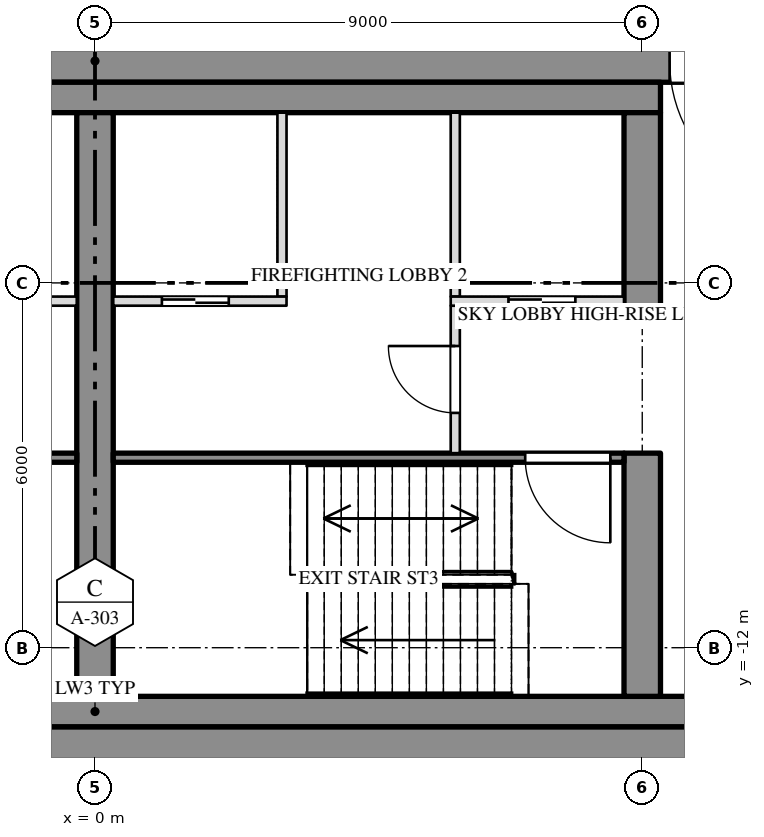
"""IFC4 building model, lengths in metres.
Left out: names, types, materials, properties, quantities, classifications, styles, units other than length and angle.
Written with IfcOpenShell. Run it as: python <this file> out.ifc"""

import sys

from ifc_helpers import new_model, si_unit, direction, frame, frame_2d, origin, place, context, subcontext, project, spatial, rectangle, extrude, element, fill, save


model = new_model("IFC4")
c1 = context("Model", 3, precision=1e-05, world=origin(), true_north=direction((0.0, 1.0)))
c2 = subcontext(c1, "Body", "Model", "MODEL_VIEW")
j1 = project(units=[si_unit("LENGTHUNIT", "METRE"), si_unit("PLANEANGLEUNIT", "RADIAN")], contexts=[c1])
p1 = place(None, origin())
s1 = spatial("IfcSite", under=j1, at=p1, CompositionType="ELEMENT")
p2 = place(p1, origin())
s2 = spatial("IfcBuilding", under=s1, at=p2, CompositionType="ELEMENT")
p3 = place(p2, frame((0.0, 0.0, 264.5)))
s3 = spatial("IfcBuildingStorey", under=s2, at=p3, CompositionType="ELEMENT", Elevation=264.5)
p4 = place(p3, frame((-27.0, -2.35, 0.0), z_axis=(0.0, 0.0, 1.0), x_axis=(1.0, 0.0, 0.0)))
e1 = element("IfcWall", 1, at=p4, inside=s3, PredefinedType="SHEAR", context=c2, shape_type="SweptSolid", body=[
    extrude(rectangle(XDim=54.0, YDim=0.7, at=frame_2d((27.0, 0.0))), origin(), (0.0, 0.0, 1.0), 3.65),
])
p5 = place(p4, frame((15.15, 0.0, 0.0)))
e2 = element("IfcOpeningElement", 2, at=p5, cuts=e1, PredefinedType="OPENING", context=c2, shape_type="SweptSolid", body=[
    extrude(rectangle(XDim=2.4, YDim=2.1, at=frame_2d((1.2, 1.05))), frame((0.0, 0.362, 0.0), z_axis=(0.0, -1.0, 0.0), x_axis=(1.0, 0.0, 0.0)), (0.0, 0.0, 1.0), 0.724),
])
p6 = place(p4, frame((36.45, 0.0, 0.0)))
e3 = element("IfcOpeningElement", 3, at=p6, cuts=e1, PredefinedType="OPENING", context=c2, shape_type="SweptSolid", body=[
    extrude(rectangle(XDim=2.4, YDim=2.1, at=frame_2d((1.2, 1.05))), frame((0.0, 0.362, 0.0), z_axis=(0.0, -1.0, 0.0), x_axis=(1.0, 0.0, 0.0)), (0.0, 0.0, 1.0), 0.724),
])
p7 = place(p3, frame((-27.0, -13.65, 0.0), z_axis=(0.0, 0.0, 1.0), x_axis=(1.0, 0.0, 0.0)))
e4 = element("IfcWall", 4, at=p7, inside=s3, PredefinedType="SHEAR", context=c2, shape_type="SweptSolid", body=[
    extrude(rectangle(XDim=54.0, YDim=0.7, at=frame_2d((27.0, 0.0))), origin(), (0.0, 0.0, 1.0), 3.65),
])
p8 = place(p3, frame((-9.3, -2.95, 0.0), z_axis=(0.0, 0.0, 1.0), x_axis=(1.0, 0.0, 0.0)))
e5 = element("IfcWall", 5, at=p8, inside=s3, PredefinedType="SHEAR", context=c2, shape_type="SweptSolid", body=[
    extrude(rectangle(XDim=18.6, YDim=0.5, at=frame_2d((9.3, 0.0))), origin(), (0.0, 0.0, 1.0), 3.65),
])
p9 = place(p3, frame((-26.3, -13.05, 0.0), z_axis=(0.0, 0.0, 1.0), x_axis=(1.0, 0.0, 0.0)))
e6 = element("IfcWall", 6, at=p9, inside=s3, PredefinedType="SHEAR", context=c2, shape_type="SweptSolid", body=[
    extrude(rectangle(XDim=52.6, YDim=0.5, at=frame_2d((26.3, 0.0))), origin(), (0.0, 0.0, 1.0), 3.65),
])
p10 = place(p3, frame((0.0, -12.8, 0.0), z_axis=(0.0, 0.0, 1.0), x_axis=(0.0, 1.0, 0.0)))
e7 = element("IfcWall", 7, at=p10, inside=s3, PredefinedType="SHEAR", context=c2, shape_type="SweptSolid", body=[
    extrude(rectangle(XDim=9.6, YDim=0.6, at=frame_2d((4.8, 0.0))), origin(), (0.0, 0.0, 1.0), 3.65),
])
p11 = place(p3, frame((9.0, -12.8, 0.0), z_axis=(0.0, 0.0, 1.0), x_axis=(0.0, 1.0, 0.0)))
e8 = element("IfcWall", 8, at=p11, inside=s3, PredefinedType="SHEAR", context=c2, shape_type="SweptSolid", body=[
    extrude(rectangle(XDim=4.0, YDim=0.6, at=frame_2d((2.0, 0.0))), origin(), (0.0, 0.0, 1.0), 3.65),
])
p12 = place(p3, frame((9.0, -6.375, 0.0), z_axis=(0.0, 0.0, 1.0), x_axis=(0.0, 1.0, 0.0)))
e9 = element("IfcWall", 9, at=p12, inside=s3, PredefinedType="SHEAR", context=c2, shape_type="SweptSolid", body=[
    extrude(rectangle(XDim=3.175, YDim=0.6, at=frame_2d((1.587, 0.0))), origin(), (0.0, 0.0, 1.0), 3.65),
])
for number, where, z_axis, x_axis in (
    (10, (3.075, -6.225, 0.0), (0.0, 0.0, 1.0), (0.0, 1.0, 0.0)),
    (11, (5.925, -6.225, 0.0), (0.0, 0.0, 1.0), (0.0, 1.0, 0.0)),
):
    element("IfcWall", number, at=place(p3, frame(where, z_axis=z_axis, x_axis=x_axis)), inside=s3, PredefinedType="PARTITIONING", context=c2, shape_type="SweptSolid", body=[
        extrude(rectangle(XDim=3.025, YDim=0.15, at=frame_2d((1.513, 0.0))), origin(), (0.0, 0.0, 1.0), 3.65),
    ])
p13 = place(p3, frame((5.925, -8.8, 0.0), z_axis=(0.0, 0.0, 1.0), x_axis=(0.0, 1.0, 0.0)))
e12 = element("IfcWall", 12, at=p13, inside=s3, PredefinedType="PARTITIONING", context=c2, shape_type="SweptSolid", body=[
    extrude(rectangle(XDim=2.425, YDim=0.15, at=frame_2d((1.212, 0.0))), origin(), (0.0, 0.0, 1.0), 3.65),
])
p14 = place(p13, frame((0.662, 0.0, 0.0)))
e13 = element("IfcOpeningElement", 13, at=p14, cuts=e12, PredefinedType="OPENING", context=c2, shape_type="SweptSolid", body=[
    extrude(rectangle(XDim=1.1, YDim=2.1, at=frame_2d((0.55, 1.05))), frame((0.0, 0.087, 0.0), z_axis=(0.0, -1.0, 0.0), x_axis=(1.0, 0.0, 0.0)), (0.0, 0.0, 1.0), 0.174),
])
p15 = place(p3, frame((-3.15, -6.3, 0.0), z_axis=(0.0, 0.0, 1.0), x_axis=(1.0, 0.0, 0.0)))
e14 = element("IfcWall", 14, at=p15, inside=s3, PredefinedType="PARTITIONING", context=c2, shape_type="SweptSolid", body=[
    extrude(rectangle(XDim=2.85, YDim=0.15, at=frame_2d((1.425, 0.0))), origin(), (0.0, 0.0, 1.0), 3.65),
])
p16 = place(p15, frame((0.95, 0.0, 0.0)))
e15 = element("IfcOpeningElement", 15, at=p16, cuts=e14, PredefinedType="OPENING", context=c2, shape_type="SweptSolid", body=[
    extrude(rectangle(XDim=1.1, YDim=2.1, at=frame_2d((0.55, 1.05))), frame((0.0, 0.087, 0.0), z_axis=(0.0, -1.0, 0.0), x_axis=(1.0, 0.0, 0.0)), (0.0, 0.0, 1.0), 0.174),
])
p17 = place(p3, frame((0.3, -6.3, 0.0), z_axis=(0.0, 0.0, 1.0), x_axis=(1.0, 0.0, 0.0)))
e16 = element("IfcWall", 16, at=p17, inside=s3, PredefinedType="PARTITIONING", context=c2, shape_type="SweptSolid", body=[
    extrude(rectangle(XDim=2.85, YDim=0.15, at=frame_2d((1.425, 0.0))), origin(), (0.0, 0.0, 1.0), 3.65),
])
p18 = place(p17, frame((0.8, 0.0, 0.0)))
e17 = element("IfcOpeningElement", 17, at=p18, cuts=e16, PredefinedType="OPENING", context=c2, shape_type="SweptSolid", body=[
    extrude(rectangle(XDim=1.1, YDim=2.1, at=frame_2d((0.55, 1.05))), frame((0.0, 0.087, 0.0), z_axis=(0.0, -1.0, 0.0), x_axis=(1.0, 0.0, 0.0)), (0.0, 0.0, 1.0), 0.174),
])
p19 = place(p3, frame((5.85, -6.3, 0.0), z_axis=(0.0, 0.0, 1.0), x_axis=(1.0, 0.0, 0.0)))
e18 = element("IfcWall", 18, at=p19, inside=s3, PredefinedType="PARTITIONING", context=c2, shape_type="SweptSolid", body=[
    extrude(rectangle(XDim=2.85, YDim=0.15, at=frame_2d((1.425, 0.0))), origin(), (0.0, 0.0, 1.0), 3.65),
])
p20 = place(p19, frame((0.95, 0.0, 0.0)))
e19 = element("IfcOpeningElement", 19, at=p20, cuts=e18, PredefinedType="OPENING", context=c2, shape_type="SweptSolid", body=[
    extrude(rectangle(XDim=1.1, YDim=2.1, at=frame_2d((0.55, 1.05))), frame((0.0, 0.087, 0.0), z_axis=(0.0, -1.0, 0.0), x_axis=(1.0, 0.0, 0.0)), (0.0, 0.0, 1.0), 0.174),
])
p21 = place(p3, frame((-8.7, -8.875, 0.0), z_axis=(0.0, 0.0, 1.0), x_axis=(1.0, 0.0, 0.0)))
e20 = element("IfcWall", 20, at=p21, inside=s3, PredefinedType="SHEAR", context=c2, shape_type="SweptSolid", body=[
    extrude(rectangle(XDim=8.4, YDim=0.15, at=frame_2d((4.2, 0.0))), origin(), (0.0, 0.0, 1.0), 3.65),
])
p22 = place(p21, frame((0.225, 0.0, 0.0)))
e21 = element("IfcOpeningElement", 21, at=p22, cuts=e20, PredefinedType="OPENING", context=c2, shape_type="SweptSolid", body=[
    extrude(rectangle(XDim=1.4, YDim=2.1, at=frame_2d((0.7, 1.05))), frame((0.0, 0.087, 0.0), z_axis=(0.0, -1.0, 0.0), x_axis=(1.0, 0.0, 0.0)), (0.0, 0.0, 1.0), 0.174),
])
p23 = place(p3, frame((0.3, -8.875, 0.0), z_axis=(0.0, 0.0, 1.0), x_axis=(1.0, 0.0, 0.0)))
e22 = element("IfcWall", 22, at=p23, inside=s3, PredefinedType="SHEAR", context=c2, shape_type="SweptSolid", body=[
    extrude(rectangle(XDim=8.4, YDim=0.15, at=frame_2d((4.2, 0.0))), origin(), (0.0, 0.0, 1.0), 3.65),
])
p24 = place(p23, frame((6.775, 0.0, 0.0)))
e23 = element("IfcOpeningElement", 23, at=p24, cuts=e22, PredefinedType="OPENING", context=c2, shape_type="SweptSolid", body=[
    extrude(rectangle(XDim=1.4, YDim=2.1, at=frame_2d((0.7, 1.05))), frame((0.0, 0.087, 0.0), z_axis=(0.0, -1.0, 0.0), x_axis=(1.0, 0.0, 0.0)), (0.0, 0.0, 1.0), 0.174),
])
p25 = place(p18, origin())
e24 = element("IfcDoor", 24, at=p25, inside=s3, OperationType="SLIDING_TO_RIGHT", PredefinedType="DOOR", context=c2, shape_type="SweptSolid", body=[
    extrude(rectangle(XDim=1.1, YDim=2.1, at=frame_2d((0.55, 1.05))), frame((0.0, 0.025, 0.0), z_axis=(0.0, -1.0, 0.0), x_axis=(1.0, 0.0, 0.0)), (0.0, 0.0, 1.0), 0.05),
])
fill(e17, e24)
p26 = place(p14, origin())
e25 = element("IfcDoor", 25, at=p26, inside=s3, OperationType="SINGLE_SWING_RIGHT", PredefinedType="DOOR", context=c2, shape_type="SweptSolid", body=[
    extrude(rectangle(XDim=1.1, YDim=2.1, at=frame_2d((0.55, 1.05))), frame((0.0, 0.025, 0.0), z_axis=(0.0, -1.0, 0.0), x_axis=(1.0, 0.0, 0.0)), (0.0, 0.0, 1.0), 0.05),
])
fill(e13, e25)
p27 = place(p20, origin())
e26 = element("IfcDoor", 26, at=p27, inside=s3, OperationType="SLIDING_TO_RIGHT", PredefinedType="DOOR", context=c2, shape_type="SweptSolid", body=[
    extrude(rectangle(XDim=1.1, YDim=2.1, at=frame_2d((0.55, 1.05))), frame((0.0, 0.025, 0.0), z_axis=(0.0, -1.0, 0.0), x_axis=(1.0, 0.0, 0.0)), (0.0, 0.0, 1.0), 0.05),
])
fill(e19, e26)
p28 = place(p24, origin())
e27 = element("IfcDoor", 27, at=p28, inside=s3, OperationType="DOUBLE_DOOR_SINGLE_SWING", PredefinedType="DOOR", context=c2, shape_type="SweptSolid", body=[
    extrude(rectangle(XDim=1.4, YDim=2.1, at=frame_2d((0.7, 1.05))), frame((0.0, 0.025, 0.0), z_axis=(0.0, -1.0, 0.0), x_axis=(1.0, 0.0, 0.0)), (0.0, 0.0, 1.0), 0.05),
])
fill(e23, e27)
p29 = place(p6, origin())
e28 = element("IfcDoor", 28, at=p29, inside=s3, OperationType="DOUBLE_DOOR_SINGLE_SWING", PredefinedType="DOOR", context=c2, shape_type="SweptSolid", body=[
    extrude(rectangle(XDim=2.4, YDim=2.1, at=frame_2d((1.2, 1.05))), frame((0.0, 0.025, 0.0), z_axis=(0.0, -1.0, 0.0), x_axis=(1.0, 0.0, 0.0)), (0.0, 0.0, 1.0), 0.05),
])
fill(e3, e28)
save(model, sys.argv[1])
